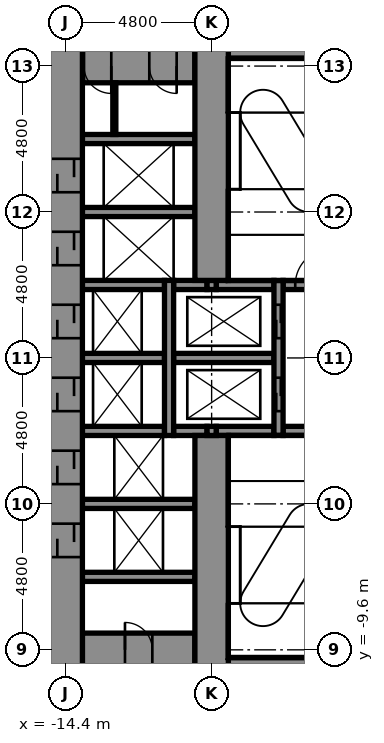
"""IFC4 building model, lengths in metres.
Left out: names, types, materials, properties, quantities, classifications, styles, units other than length and angle.
Written with IfcOpenShell. Run it as: python <this file> out.ifc"""

import sys

from ifc_helpers import new_model, si_unit, direction, frame, frame_2d, origin, place, context, subcontext, project, spatial, rectangle, extrude, element, fill, save


model = new_model("IFC4")
c1 = context("Model", 3, precision=1e-05, world=origin(), true_north=direction((0.0, 1.0)))
c2 = subcontext(c1, "Body", "Model", "MODEL_VIEW")
j1 = project(units=[si_unit("LENGTHUNIT", "METRE"), si_unit("PLANEANGLEUNIT", "RADIAN")], contexts=[c1])
p1 = place(None, origin())
s1 = spatial("IfcSite", under=j1, at=p1, CompositionType="ELEMENT")
p2 = place(p1, origin())
s2 = spatial("IfcBuilding", under=s1, at=p2, CompositionType="ELEMENT")
p3 = place(p2, origin())
s3 = spatial("IfcBuildingStorey", under=s2, at=p3, CompositionType="ELEMENT", Elevation=0.0)
p4 = place(p3, frame((-9.05, -10.0, -0.4), z_axis=(0.0, 0.0, 1.0), x_axis=(1.0, 0.0, 0.0)))
e1 = element("IfcWall", 1, at=p4, inside=s3, PredefinedType="STANDARD", context=c2, shape_type="SweptSolid", body=[
    extrude(rectangle(XDim=3.8, YDim=0.3, at=frame_2d((1.9, 0.0))), origin(), (0.0, 0.0, 1.0), 7.1),
])
p5 = place(p3, frame((-13.85, -9.6, -0.4), z_axis=(0.0, 0.0, 1.0), x_axis=(1.0, 0.0, 0.0)))
e2 = element("IfcWall", 2, at=p5, inside=s3, PredefinedType="SHEAR", context=c2, shape_type="SweptSolid", body=[
    extrude(rectangle(XDim=3.7, YDim=1.1, at=frame_2d((1.85, 0.0))), origin(), (0.0, 0.0, 1.0), 7.1),
])
p6 = place(p5, frame((1.4, 0.0, 0.4)))
e3 = element("IfcOpeningElement", 3, at=p6, cuts=e2, PredefinedType="OPENING", context=c2, shape_type="SweptSolid", body=[
    extrude(rectangle(XDim=0.9, YDim=2.1, at=frame_2d((0.45, 1.05))), frame((0.0, 0.56, 0.0), z_axis=(0.0, -1.0, 0.0), x_axis=(1.0, 0.0, 0.0)), (0.0, 0.0, 1.0), 1.12),
])
for number, where, z_axis, x_axis in (
    (4, (-13.85, -7.2, -0.4), (0.0, 0.0, 1.0), (1.0, 0.0, 0.0)),
    (5, (-13.85, -4.8, -0.4), (0.0, 0.0, 1.0), (1.0, 0.0, 0.0)),
):
    element("IfcWall", number, at=place(p3, frame(where, z_axis=z_axis, x_axis=x_axis)), inside=s3, PredefinedType="STANDARD", context=c2, shape_type="SweptSolid", body=[
        extrude(rectangle(XDim=3.7, YDim=0.3, at=frame_2d((1.85, 0.0))), origin(), (0.0, 0.0, 1.0), 7.1),
    ])
p7 = place(p3, frame((-13.85, -2.4, -0.4), z_axis=(0.0, 0.0, 1.0), x_axis=(1.0, 0.0, 0.0)))
e6 = element("IfcWall", 6, at=p7, inside=s3, PredefinedType="STANDARD", context=c2, shape_type="SweptSolid", body=[
    extrude(rectangle(XDim=2.7, YDim=0.3, at=frame_2d((1.35, 0.0))), origin(), (0.0, 0.0, 1.0), 7.1),
])
p8 = place(p3, frame((-10.85, -2.4, -0.4), z_axis=(0.0, 0.0, 1.0), x_axis=(1.0, 0.0, 0.0)))
e7 = element("IfcWall", 7, at=p8, inside=s3, PredefinedType="STANDARD", context=c2, shape_type="SweptSolid", body=[
    extrude(rectangle(XDim=1.1, YDim=0.3, at=frame_2d((0.55, 0.0))), origin(), (0.0, 0.0, 1.0), 7.1),
])
p9 = place(p3, frame((-9.45, -2.4, -0.4), z_axis=(0.0, 0.0, 1.0), x_axis=(1.0, 0.0, 0.0)))
e8 = element("IfcWall", 8, at=p9, inside=s3, PredefinedType="STANDARD", context=c2, shape_type="SweptSolid", body=[
    extrude(rectangle(XDim=1.9, YDim=0.3, at=frame_2d((0.95, 0.0))), origin(), (0.0, 0.0, 1.0), 7.1),
])
p10 = place(p3, frame((-7.25, -2.4, -0.4), z_axis=(0.0, 0.0, 1.0), x_axis=(1.0, 0.0, 0.0)))
e9 = element("IfcWall", 9, at=p10, inside=s3, PredefinedType="STANDARD", context=c2, shape_type="SweptSolid", body=[
    extrude(rectangle(XDim=2.0, YDim=0.3, at=frame_2d((1.0, 0.0))), origin(), (0.0, 0.0, 1.0), 7.1),
])
p11 = place(p3, frame((-13.85, 0.0, -0.4), z_axis=(0.0, 0.0, 1.0), x_axis=(1.0, 0.0, 0.0)))
e10 = element("IfcWall", 10, at=p11, inside=s3, PredefinedType="STANDARD", context=c2, shape_type="SweptSolid", body=[
    extrude(rectangle(XDim=2.7, YDim=0.3, at=frame_2d((1.35, 0.0))), origin(), (0.0, 0.0, 1.0), 7.1),
])
p12 = place(p3, frame((-10.85, 0.0, -0.4), z_axis=(0.0, 0.0, 1.0), x_axis=(1.0, 0.0, 0.0)))
e11 = element("IfcWall", 11, at=p12, inside=s3, PredefinedType="STANDARD", context=c2, shape_type="SweptSolid", body=[
    extrude(rectangle(XDim=3.3, YDim=0.3, at=frame_2d((1.65, 0.0))), origin(), (0.0, 0.0, 1.0), 7.1),
])
p13 = place(p3, frame((-13.85, 2.4, -0.4), z_axis=(0.0, 0.0, 1.0), x_axis=(1.0, 0.0, 0.0)))
e12 = element("IfcWall", 12, at=p13, inside=s3, PredefinedType="STANDARD", context=c2, shape_type="SweptSolid", body=[
    extrude(rectangle(XDim=2.7, YDim=0.3, at=frame_2d((1.35, 0.0))), origin(), (0.0, 0.0, 1.0), 7.1),
])
p14 = place(p3, frame((-10.85, 2.4, -0.4), z_axis=(0.0, 0.0, 1.0), x_axis=(1.0, 0.0, 0.0)))
e13 = element("IfcWall", 13, at=p14, inside=s3, PredefinedType="STANDARD", context=c2, shape_type="SweptSolid", body=[
    extrude(rectangle(XDim=1.1, YDim=0.3, at=frame_2d((0.55, 0.0))), origin(), (0.0, 0.0, 1.0), 7.1),
])
p15 = place(p3, frame((-9.45, 2.4, -0.4), z_axis=(0.0, 0.0, 1.0), x_axis=(1.0, 0.0, 0.0)))
e14 = element("IfcWall", 14, at=p15, inside=s3, PredefinedType="STANDARD", context=c2, shape_type="SweptSolid", body=[
    extrude(rectangle(XDim=1.9, YDim=0.3, at=frame_2d((0.95, 0.0))), origin(), (0.0, 0.0, 1.0), 7.1),
])
p16 = place(p3, frame((-7.25, 2.4, -0.4), z_axis=(0.0, 0.0, 1.0), x_axis=(1.0, 0.0, 0.0)))
e15 = element("IfcWall", 15, at=p16, inside=s3, PredefinedType="STANDARD", context=c2, shape_type="SweptSolid", body=[
    extrude(rectangle(XDim=2.0, YDim=0.3, at=frame_2d((1.0, 0.0))), origin(), (0.0, 0.0, 1.0), 7.1),
])
p17 = place(p16, frame((0.4, 0.0, 0.4)))
e16 = element("IfcOpeningElement", 16, at=p17, cuts=e15, PredefinedType="OPENING", context=c2, shape_type="SweptSolid", body=[
    extrude(rectangle(XDim=1.2, YDim=2.1, at=frame_2d((0.6, 1.05))), frame((0.0, 0.16, 0.0), z_axis=(0.0, -1.0, 0.0), x_axis=(1.0, 0.0, 0.0)), (0.0, 0.0, 1.0), 0.32),
])
for number, where, z_axis, x_axis in (
    (17, (-13.85, 4.8, -0.4), (0.0, 0.0, 1.0), (1.0, 0.0, 0.0)),
    (18, (-13.85, 7.2, -0.4), (0.0, 0.0, 1.0), (1.0, 0.0, 0.0)),
):
    element("IfcWall", number, at=place(p3, frame(where, z_axis=z_axis, x_axis=x_axis)), inside=s3, PredefinedType="STANDARD", context=c2, shape_type="SweptSolid", body=[
        extrude(rectangle(XDim=3.7, YDim=0.3, at=frame_2d((1.85, 0.0))), origin(), (0.0, 0.0, 1.0), 7.1),
    ])
p18 = place(p3, frame((-13.85, 9.6, -0.4), z_axis=(0.0, 0.0, 1.0), x_axis=(1.0, 0.0, 0.0)))
e19 = element("IfcWall", 19, at=p18, inside=s3, PredefinedType="SHEAR", context=c2, shape_type="SweptSolid", body=[
    extrude(rectangle(XDim=3.7, YDim=1.1, at=frame_2d((1.85, 0.0))), origin(), (0.0, 0.0, 1.0), 7.1),
])
p19 = place(p18, frame((0.05, 0.0, 0.4)))
e20 = element("IfcOpeningElement", 20, at=p19, cuts=e19, PredefinedType="OPENING", context=c2, shape_type="SweptSolid", body=[
    extrude(rectangle(XDim=0.9, YDim=2.1, at=frame_2d((0.45, 1.05))), frame((0.0, 0.56, 0.0), z_axis=(0.0, -1.0, 0.0), x_axis=(1.0, 0.0, 0.0)), (0.0, 0.0, 1.0), 1.12),
])
p20 = place(p18, frame((2.2, 0.0, 0.4)))
e21 = element("IfcOpeningElement", 21, at=p20, cuts=e19, PredefinedType="OPENING", context=c2, shape_type="SweptSolid", body=[
    extrude(rectangle(XDim=0.9, YDim=2.1, at=frame_2d((0.45, 1.05))), frame((0.0, 0.56, 0.0), z_axis=(0.0, -1.0, 0.0), x_axis=(1.0, 0.0, 0.0)), (0.0, 0.0, 1.0), 1.12),
])
p21 = place(p3, frame((-9.05, 10.0, -0.4), z_axis=(0.0, 0.0, 1.0), x_axis=(1.0, 0.0, 0.0)))
e22 = element("IfcWall", 22, at=p21, inside=s3, PredefinedType="STANDARD", context=c2, shape_type="SweptSolid", body=[
    extrude(rectangle(XDim=3.8, YDim=0.3, at=frame_2d((1.9, 0.0))), origin(), (0.0, 0.0, 1.0), 7.1),
])
p22 = place(p3, frame((-14.4, -10.15, -0.4), z_axis=(0.0, 0.0, 1.0), x_axis=(0.0, 1.0, 0.0)))
e23 = element("IfcWall", 23, at=p22, inside=s3, PredefinedType="SHEAR", context=c2, shape_type="SweptSolid", body=[
    extrude(rectangle(XDim=20.3, YDim=1.1, at=frame_2d((10.15, 0.0))), origin(), (0.0, 0.0, 1.0), 7.1),
])
p23 = place(p22, frame((3.6, 0.0, 0.4)))
e24 = element("IfcOpeningElement", 24, at=p23, cuts=e23, PredefinedType="OPENING", context=c2, shape_type="SweptSolid", body=[
    extrude(rectangle(XDim=1.1, YDim=2.1, at=frame_2d((0.55, 1.05))), frame((0.0, 0.56, 0.0), z_axis=(0.0, -1.0, 0.0), x_axis=(1.0, 0.0, 0.0)), (0.0, 0.0, 1.0), 1.12),
])
p24 = place(p22, frame((6.0, 0.0, 0.4)))
e25 = element("IfcOpeningElement", 25, at=p24, cuts=e23, PredefinedType="OPENING", context=c2, shape_type="SweptSolid", body=[
    extrude(rectangle(XDim=1.1, YDim=2.1, at=frame_2d((0.55, 1.05))), frame((0.0, 0.56, 0.0), z_axis=(0.0, -1.0, 0.0), x_axis=(1.0, 0.0, 0.0)), (0.0, 0.0, 1.0), 1.12),
])
p25 = place(p22, frame((8.4, 0.0, 0.4)))
e26 = element("IfcOpeningElement", 26, at=p25, cuts=e23, PredefinedType="OPENING", context=c2, shape_type="SweptSolid", body=[
    extrude(rectangle(XDim=1.1, YDim=2.1, at=frame_2d((0.55, 1.05))), frame((0.0, 0.56, 0.0), z_axis=(0.0, -1.0, 0.0), x_axis=(1.0, 0.0, 0.0)), (0.0, 0.0, 1.0), 1.12),
])
p26 = place(p22, frame((10.8, 0.0, 0.4)))
e27 = element("IfcOpeningElement", 27, at=p26, cuts=e23, PredefinedType="OPENING", context=c2, shape_type="SweptSolid", body=[
    extrude(rectangle(XDim=1.1, YDim=2.1, at=frame_2d((0.55, 1.05))), frame((0.0, 0.56, 0.0), z_axis=(0.0, -1.0, 0.0), x_axis=(1.0, 0.0, 0.0)), (0.0, 0.0, 1.0), 1.12),
])
p27 = place(p22, frame((13.2, 0.0, 0.4)))
e28 = element("IfcOpeningElement", 28, at=p27, cuts=e23, PredefinedType="OPENING", context=c2, shape_type="SweptSolid", body=[
    extrude(rectangle(XDim=1.1, YDim=2.1, at=frame_2d((0.55, 1.05))), frame((0.0, 0.56, 0.0), z_axis=(0.0, -1.0, 0.0), x_axis=(1.0, 0.0, 0.0)), (0.0, 0.0, 1.0), 1.12),
])
p28 = place(p22, frame((15.6, 0.0, 0.4)))
e29 = element("IfcOpeningElement", 29, at=p28, cuts=e23, PredefinedType="OPENING", context=c2, shape_type="SweptSolid", body=[
    extrude(rectangle(XDim=1.1, YDim=2.1, at=frame_2d((0.55, 1.05))), frame((0.0, 0.56, 0.0), z_axis=(0.0, -1.0, 0.0), x_axis=(1.0, 0.0, 0.0)), (0.0, 0.0, 1.0), 1.12),
])
p29 = place(p3, frame((-11.0, -2.55, -0.4), z_axis=(0.0, 0.0, 1.0), x_axis=(0.0, 1.0, 0.0)))
e30 = element("IfcWall", 30, at=p29, inside=s3, PredefinedType="STANDARD", context=c2, shape_type="SweptSolid", body=[
    extrude(rectangle(XDim=5.1, YDim=0.3, at=frame_2d((2.55, 0.0))), origin(), (0.0, 0.0, 1.0), 7.1),
])
p30 = place(p3, frame((-9.6, -10.15, -0.4), z_axis=(0.0, 0.0, 1.0), x_axis=(0.0, 1.0, 0.0)))
e31 = element("IfcWall", 31, at=p30, inside=s3, PredefinedType="SHEAR", context=c2, shape_type="SweptSolid", body=[
    extrude(rectangle(XDim=7.6, YDim=1.1, at=frame_2d((3.8, 0.0))), origin(), (0.0, 0.0, 1.0), 7.1),
])
for number, where, z_axis, x_axis in (
    (32, (-9.6, -2.55, -0.4), (0.0, 0.0, 1.0), (0.0, 1.0, 0.0)),
    (33, (-9.6, 2.25, -0.4), (0.0, 0.0, 1.0), (0.0, 1.0, 0.0)),
):
    element("IfcWall", number, at=place(p3, frame(where, z_axis=z_axis, x_axis=x_axis)), inside=s3, PredefinedType="STANDARD", context=c2, shape_type="SweptSolid", body=[
        extrude(rectangle(XDim=0.3, YDim=0.3, at=frame_2d((0.15, 0.0))), origin(), (0.0, 0.0, 1.0), 7.1),
    ])
p31 = place(p3, frame((-9.6, 2.55, -0.4), z_axis=(0.0, 0.0, 1.0), x_axis=(0.0, 1.0, 0.0)))
e34 = element("IfcWall", 34, at=p31, inside=s3, PredefinedType="SHEAR", context=c2, shape_type="SweptSolid", body=[
    extrude(rectangle(XDim=7.6, YDim=1.1, at=frame_2d((3.8, 0.0))), origin(), (0.0, 0.0, 1.0), 7.1),
])
p32 = place(p3, frame((-7.4, -2.55, -0.4), z_axis=(0.0, 0.0, 1.0), x_axis=(0.0, 1.0, 0.0)))
e35 = element("IfcWall", 35, at=p32, inside=s3, PredefinedType="STANDARD", context=c2, shape_type="SweptSolid", body=[
    extrude(rectangle(XDim=5.1, YDim=0.3, at=frame_2d((2.55, 0.0))), origin(), (0.0, 0.0, 1.0), 7.1),
])
p33 = place(p32, frame((0.8, 0.0, 0.4)))
e36 = element("IfcOpeningElement", 36, at=p33, cuts=e35, PredefinedType="OPENING", context=c2, shape_type="SweptSolid", body=[
    extrude(rectangle(XDim=1.1, YDim=2.1, at=frame_2d((0.55, 1.05))), frame((0.0, 0.16, 0.0), z_axis=(0.0, -1.0, 0.0), x_axis=(1.0, 0.0, 0.0)), (0.0, 0.0, 1.0), 0.32),
])
p34 = place(p32, frame((3.2, 0.0, 0.4)))
e37 = element("IfcOpeningElement", 37, at=p34, cuts=e35, PredefinedType="OPENING", context=c2, shape_type="SweptSolid", body=[
    extrude(rectangle(XDim=1.1, YDim=2.1, at=frame_2d((0.55, 1.05))), frame((0.0, 0.16, 0.0), z_axis=(0.0, -1.0, 0.0), x_axis=(1.0, 0.0, 0.0)), (0.0, 0.0, 1.0), 0.32),
])
p35 = place(p3, frame((-12.8, 7.35, 0.0), z_axis=(0.0, 0.0, 1.0), x_axis=(0.0, 1.0, 0.0)))
e38 = element("IfcWall", 38, at=p35, inside=s3, PredefinedType="PARTITIONING", context=c2, shape_type="SweptSolid", body=[
    extrude(rectangle(XDim=1.7, YDim=0.1, at=frame_2d((0.85, 0.0))), origin(), (0.0, 0.0, 1.0), 6.7),
])
p36 = place(p33, origin())
e39 = element("IfcDoor", 39, at=p36, inside=s3, OperationType="DOUBLE_DOOR_SLIDING", PredefinedType="DOOR", context=c2, shape_type="SweptSolid", body=[
    extrude(rectangle(XDim=1.1, YDim=2.1, at=frame_2d((0.55, 1.05))), frame((0.0, 0.025, 0.0), z_axis=(0.0, -1.0, 0.0), x_axis=(1.0, 0.0, 0.0)), (0.0, 0.0, 1.0), 0.05),
])
fill(e36, e39)
p37 = place(p34, origin())
e40 = element("IfcDoor", 40, at=p37, inside=s3, OperationType="DOUBLE_DOOR_SLIDING", PredefinedType="DOOR", context=c2, shape_type="SweptSolid", body=[
    extrude(rectangle(XDim=1.1, YDim=2.1, at=frame_2d((0.55, 1.05))), frame((0.0, 0.025, 0.0), z_axis=(0.0, -1.0, 0.0), x_axis=(1.0, 0.0, 0.0)), (0.0, 0.0, 1.0), 0.05),
])
fill(e37, e40)
p38 = place(p23, origin())
e41 = element("IfcDoor", 41, at=p38, inside=s3, OperationType="DOUBLE_DOOR_SLIDING", PredefinedType="DOOR", context=c2, shape_type="SweptSolid", body=[
    extrude(rectangle(XDim=1.1, YDim=2.1, at=frame_2d((0.55, 1.05))), frame((0.0, 0.025, 0.0), z_axis=(0.0, -1.0, 0.0), x_axis=(1.0, 0.0, 0.0)), (0.0, 0.0, 1.0), 0.05),
])
fill(e24, e41)
p39 = place(p24, origin())
e42 = element("IfcDoor", 42, at=p39, inside=s3, OperationType="DOUBLE_DOOR_SLIDING", PredefinedType="DOOR", context=c2, shape_type="SweptSolid", body=[
    extrude(rectangle(XDim=1.1, YDim=2.1, at=frame_2d((0.55, 1.05))), frame((0.0, 0.025, 0.0), z_axis=(0.0, -1.0, 0.0), x_axis=(1.0, 0.0, 0.0)), (0.0, 0.0, 1.0), 0.05),
])
fill(e25, e42)
p40 = place(p25, origin())
e43 = element("IfcDoor", 43, at=p40, inside=s3, OperationType="DOUBLE_DOOR_SLIDING", PredefinedType="DOOR", context=c2, shape_type="SweptSolid", body=[
    extrude(rectangle(XDim=1.1, YDim=2.1, at=frame_2d((0.55, 1.05))), frame((0.0, 0.025, 0.0), z_axis=(0.0, -1.0, 0.0), x_axis=(1.0, 0.0, 0.0)), (0.0, 0.0, 1.0), 0.05),
])
fill(e26, e43)
p41 = place(p26, origin())
e44 = element("IfcDoor", 44, at=p41, inside=s3, OperationType="DOUBLE_DOOR_SLIDING", PredefinedType="DOOR", context=c2, shape_type="SweptSolid", body=[
    extrude(rectangle(XDim=1.1, YDim=2.1, at=frame_2d((0.55, 1.05))), frame((0.0, 0.025, 0.0), z_axis=(0.0, -1.0, 0.0), x_axis=(1.0, 0.0, 0.0)), (0.0, 0.0, 1.0), 0.05),
])
fill(e27, e44)
p42 = place(p27, origin())
e45 = element("IfcDoor", 45, at=p42, inside=s3, OperationType="DOUBLE_DOOR_SLIDING", PredefinedType="DOOR", context=c2, shape_type="SweptSolid", body=[
    extrude(rectangle(XDim=1.1, YDim=2.1, at=frame_2d((0.55, 1.05))), frame((0.0, 0.025, 0.0), z_axis=(0.0, -1.0, 0.0), x_axis=(1.0, 0.0, 0.0)), (0.0, 0.0, 1.0), 0.05),
])
fill(e28, e45)
p43 = place(p28, origin())
e46 = element("IfcDoor", 46, at=p43, inside=s3, OperationType="DOUBLE_DOOR_SLIDING", PredefinedType="DOOR", context=c2, shape_type="SweptSolid", body=[
    extrude(rectangle(XDim=1.1, YDim=2.1, at=frame_2d((0.55, 1.05))), frame((0.0, 0.025, 0.0), z_axis=(0.0, -1.0, 0.0), x_axis=(1.0, 0.0, 0.0)), (0.0, 0.0, 1.0), 0.05),
])
fill(e29, e46)
p44 = place(p6, origin())
e47 = element("IfcDoor", 47, at=p44, inside=s3, OperationType="SINGLE_SWING_LEFT", PredefinedType="DOOR", context=c2, shape_type="SweptSolid", body=[
    extrude(rectangle(XDim=0.9, YDim=2.1, at=frame_2d((0.45, 1.05))), frame((0.0, 0.025, 0.0), z_axis=(0.0, -1.0, 0.0), x_axis=(1.0, 0.0, 0.0)), (0.0, 0.0, 1.0), 0.05),
])
fill(e3, e47)
p45 = place(p19, frame((0.9, 0.0, 0.0), z_axis=(0.0, 0.0, 1.0), x_axis=(-1.0, 0.0, 0.0)))
e48 = element("IfcDoor", 48, at=p45, inside=s3, OperationType="SINGLE_SWING_RIGHT", PredefinedType="DOOR", context=c2, shape_type="SweptSolid", body=[
    extrude(rectangle(XDim=0.9, YDim=2.1, at=frame_2d((0.45, 1.05))), frame((0.0, 0.025, 0.0), z_axis=(0.0, -1.0, 0.0), x_axis=(1.0, 0.0, 0.0)), (0.0, 0.0, 1.0), 0.05),
])
fill(e20, e48)
p46 = place(p20, frame((0.9, 0.0, 0.0), z_axis=(0.0, 0.0, 1.0), x_axis=(-1.0, 0.0, 0.0)))
e49 = element("IfcDoor", 49, at=p46, inside=s3, OperationType="SINGLE_SWING_RIGHT", PredefinedType="DOOR", context=c2, shape_type="SweptSolid", body=[
    extrude(rectangle(XDim=0.9, YDim=2.1, at=frame_2d((0.45, 1.05))), frame((0.0, 0.025, 0.0), z_axis=(0.0, -1.0, 0.0), x_axis=(1.0, 0.0, 0.0)), (0.0, 0.0, 1.0), 0.05),
])
fill(e21, e49)
p47 = place(p17, origin())
e50 = element("IfcDoor", 50, at=p47, inside=s3, OperationType="SINGLE_SWING_RIGHT", PredefinedType="DOOR", context=c2, shape_type="SweptSolid", body=[
    extrude(rectangle(XDim=1.2, YDim=2.1, at=frame_2d((0.6, 1.05))), frame((0.0, 0.025, 0.0), z_axis=(0.0, -1.0, 0.0), x_axis=(1.0, 0.0, 0.0)), (0.0, 0.0, 1.0), 0.05),
])
fill(e16, e50)
save(model, sys.argv[1])
